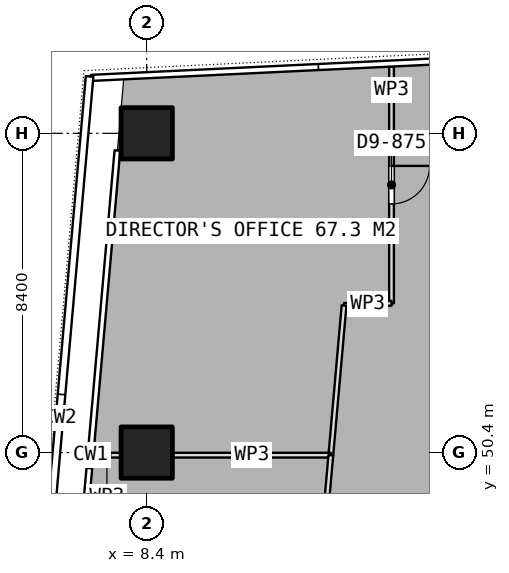
"""IFC4 building model, lengths in metres.
Left out: names, types, materials, properties, quantities, classifications, styles, units other than length and angle.
Written with IfcOpenShell. Run it as: python <this file> out.ifc"""

import sys

from ifc_helpers import new_model, si_unit, direction, frame, frame_2d, origin, origin_2d, place, context, subcontext, project, spatial, rectangle, extrude, element, fill, save


model = new_model("IFC4")
c1 = context("Model", 3, precision=1e-05, world=origin(), true_north=direction((0.0, 1.0)))
c2 = subcontext(c1, "Body", "Model", "MODEL_VIEW")
j1 = project(units=[si_unit("LENGTHUNIT", "METRE"), si_unit("PLANEANGLEUNIT", "RADIAN")], contexts=[c1])
p1 = place(None, origin())
s1 = spatial("IfcSite", under=j1, at=p1, CompositionType="ELEMENT")
p2 = place(p1, origin())
s2 = spatial("IfcBuilding", under=s1, at=p2, CompositionType="ELEMENT")
p3 = place(p2, frame((0.0, 0.0, 217.7)))
s3 = spatial("IfcBuildingStorey", under=s2, at=p3, CompositionType="ELEMENT", Elevation=217.7)
for number, where, z_axis, x_axis in (
    (1, (8.4, 50.4, 0.0), (0.0, 0.0, 1.0), (1.0, 0.0, 0.0)),
    (2, (8.4, 58.8, 0.0), (0.0, 0.0, 1.0), (1.0, 0.0, 0.0)),
):
    element("IfcColumn", number, at=place(p3, frame(where, z_axis=z_axis, x_axis=x_axis)), inside=s3, PredefinedType="COLUMN", context=c2, shape_type="SweptSolid", body=[
        extrude(rectangle(XDim=1.35, YDim=1.35, at=origin_2d()), origin(), (0.0, 0.0, 1.0), 3.75),
    ])
p4 = place(p3, frame((14.842, 60.557, 0.0), z_axis=(0.0, 0.0, 1.0), x_axis=(0.0, -1.0, 0.0)))
e3 = element("IfcWall", 3, at=p4, inside=s3, PredefinedType="PARTITIONING", context=c2, shape_type="SweptSolid", body=[
    extrude(rectangle(XDim=6.228, YDim=0.125, at=frame_2d((3.114, 0.0))), origin(), (0.0, 0.0, 1.0), 3.5),
])
p5 = place(p4, frame((2.614, 0.0, 0.0)))
e4 = element("IfcOpeningElement", 4, at=p5, cuts=e3, PredefinedType="OPENING", context=c2, shape_type="SweptSolid", body=[
    extrude(rectangle(XDim=1.0, YDim=2.1, at=frame_2d((0.5, 1.05))), frame((0.0, 0.073, 0.0), z_axis=(0.0, -1.0, 0.0), x_axis=(1.0, 0.0, 0.0)), (0.0, 0.0, 1.0), 0.145),
])
p6 = place(p3, frame((14.842, 54.329, 0.0), z_axis=(0.0, 0.0, 1.0), x_axis=(-0.998883106922, -0.047249748216, 0.0)))
e5 = element("IfcWall", 5, at=p6, inside=s3, PredefinedType="PARTITIONING", context=c2, shape_type="SweptSolid", body=[
    extrude(rectangle(XDim=1.25, YDim=0.125, at=frame_2d((0.625, 0.0))), origin(), (0.0, 0.0, 1.0), 3.5),
])
p7 = place(p3, frame((13.593, 54.27, 0.0), z_axis=(0.0, 0.0, 1.0), x_axis=(-0.088001948608, -0.996120302494, 0.0)))
e6 = element("IfcWall", 6, at=p7, inside=s3, PredefinedType="PARTITIONING", context=c2, shape_type="SweptSolid", body=[
    extrude(rectangle(XDim=3.953, YDim=0.125, at=frame_2d((1.977, 0.0))), origin(), (0.0, 0.0, 1.0), 3.5),
])
p8 = place(p3, frame((13.245, 50.332, 0.0), z_axis=(0.0, 0.0, 1.0), x_axis=(-1.0, 0.0, 0.0)))
e7 = element("IfcWall", 7, at=p8, inside=s3, PredefinedType="PARTITIONING", context=c2, shape_type="SweptSolid", body=[
    extrude(rectangle(XDim=4.15, YDim=0.125, at=frame_2d((2.075, 0.0))), origin(), (0.0, 0.0, 1.0), 3.5),
])
p9 = place(p3, frame((7.705, 50.332, 0.0), z_axis=(0.0, 0.0, 1.0), x_axis=(-1.0, 0.0, 0.0)))
e8 = element("IfcWall", 8, at=p9, inside=s3, PredefinedType="PARTITIONING", context=c2, shape_type="SweptSolid", body=[
    extrude(rectangle(XDim=0.704, YDim=0.125, at=frame_2d((0.352, 0.0))), origin(), (0.0, 0.0, 1.0), 3.5),
])
p10 = place(p3, frame((13.245, 50.331, 0.0), z_axis=(0.0, 0.0, 1.0), x_axis=(-0.087903511106, -0.996128994024, 0.0)))
e9 = element("IfcWall", 9, at=p10, inside=s3, PredefinedType="PARTITIONING", context=c2, shape_type="SweptSolid", body=[
    extrude(rectangle(XDim=8.079, YDim=0.125, at=frame_2d((4.04, 0.0))), origin(), (0.0, 0.0, 1.0), 3.5),
])
p11 = place(p10, frame((3.14, 0.0, 0.0)))
e10 = element("IfcOpeningElement", 10, at=p11, cuts=e9, PredefinedType="OPENING", context=c2, shape_type="SweptSolid", body=[
    extrude(rectangle(XDim=1.8, YDim=2.1, at=frame_2d((0.9, 1.05))), frame((0.0, 0.073, 0.0), z_axis=(0.0, -1.0, 0.0), x_axis=(1.0, 0.0, 0.0)), (0.0, 0.0, 1.0), 0.145),
])
p12 = place(p5, origin())
e11 = element("IfcDoor", 11, at=p12, inside=s3, OperationType="SINGLE_SWING_LEFT", PredefinedType="DOOR", context=c2, shape_type="SweptSolid", body=[
    extrude(rectangle(XDim=1.0, YDim=2.1, at=frame_2d((0.5, 1.05))), frame((0.0, 0.025, 0.0), z_axis=(0.0, -1.0, 0.0), x_axis=(1.0, 0.0, 0.0)), (0.0, 0.0, 1.0), 0.05),
])
fill(e4, e11)
save(model, sys.argv[1])
